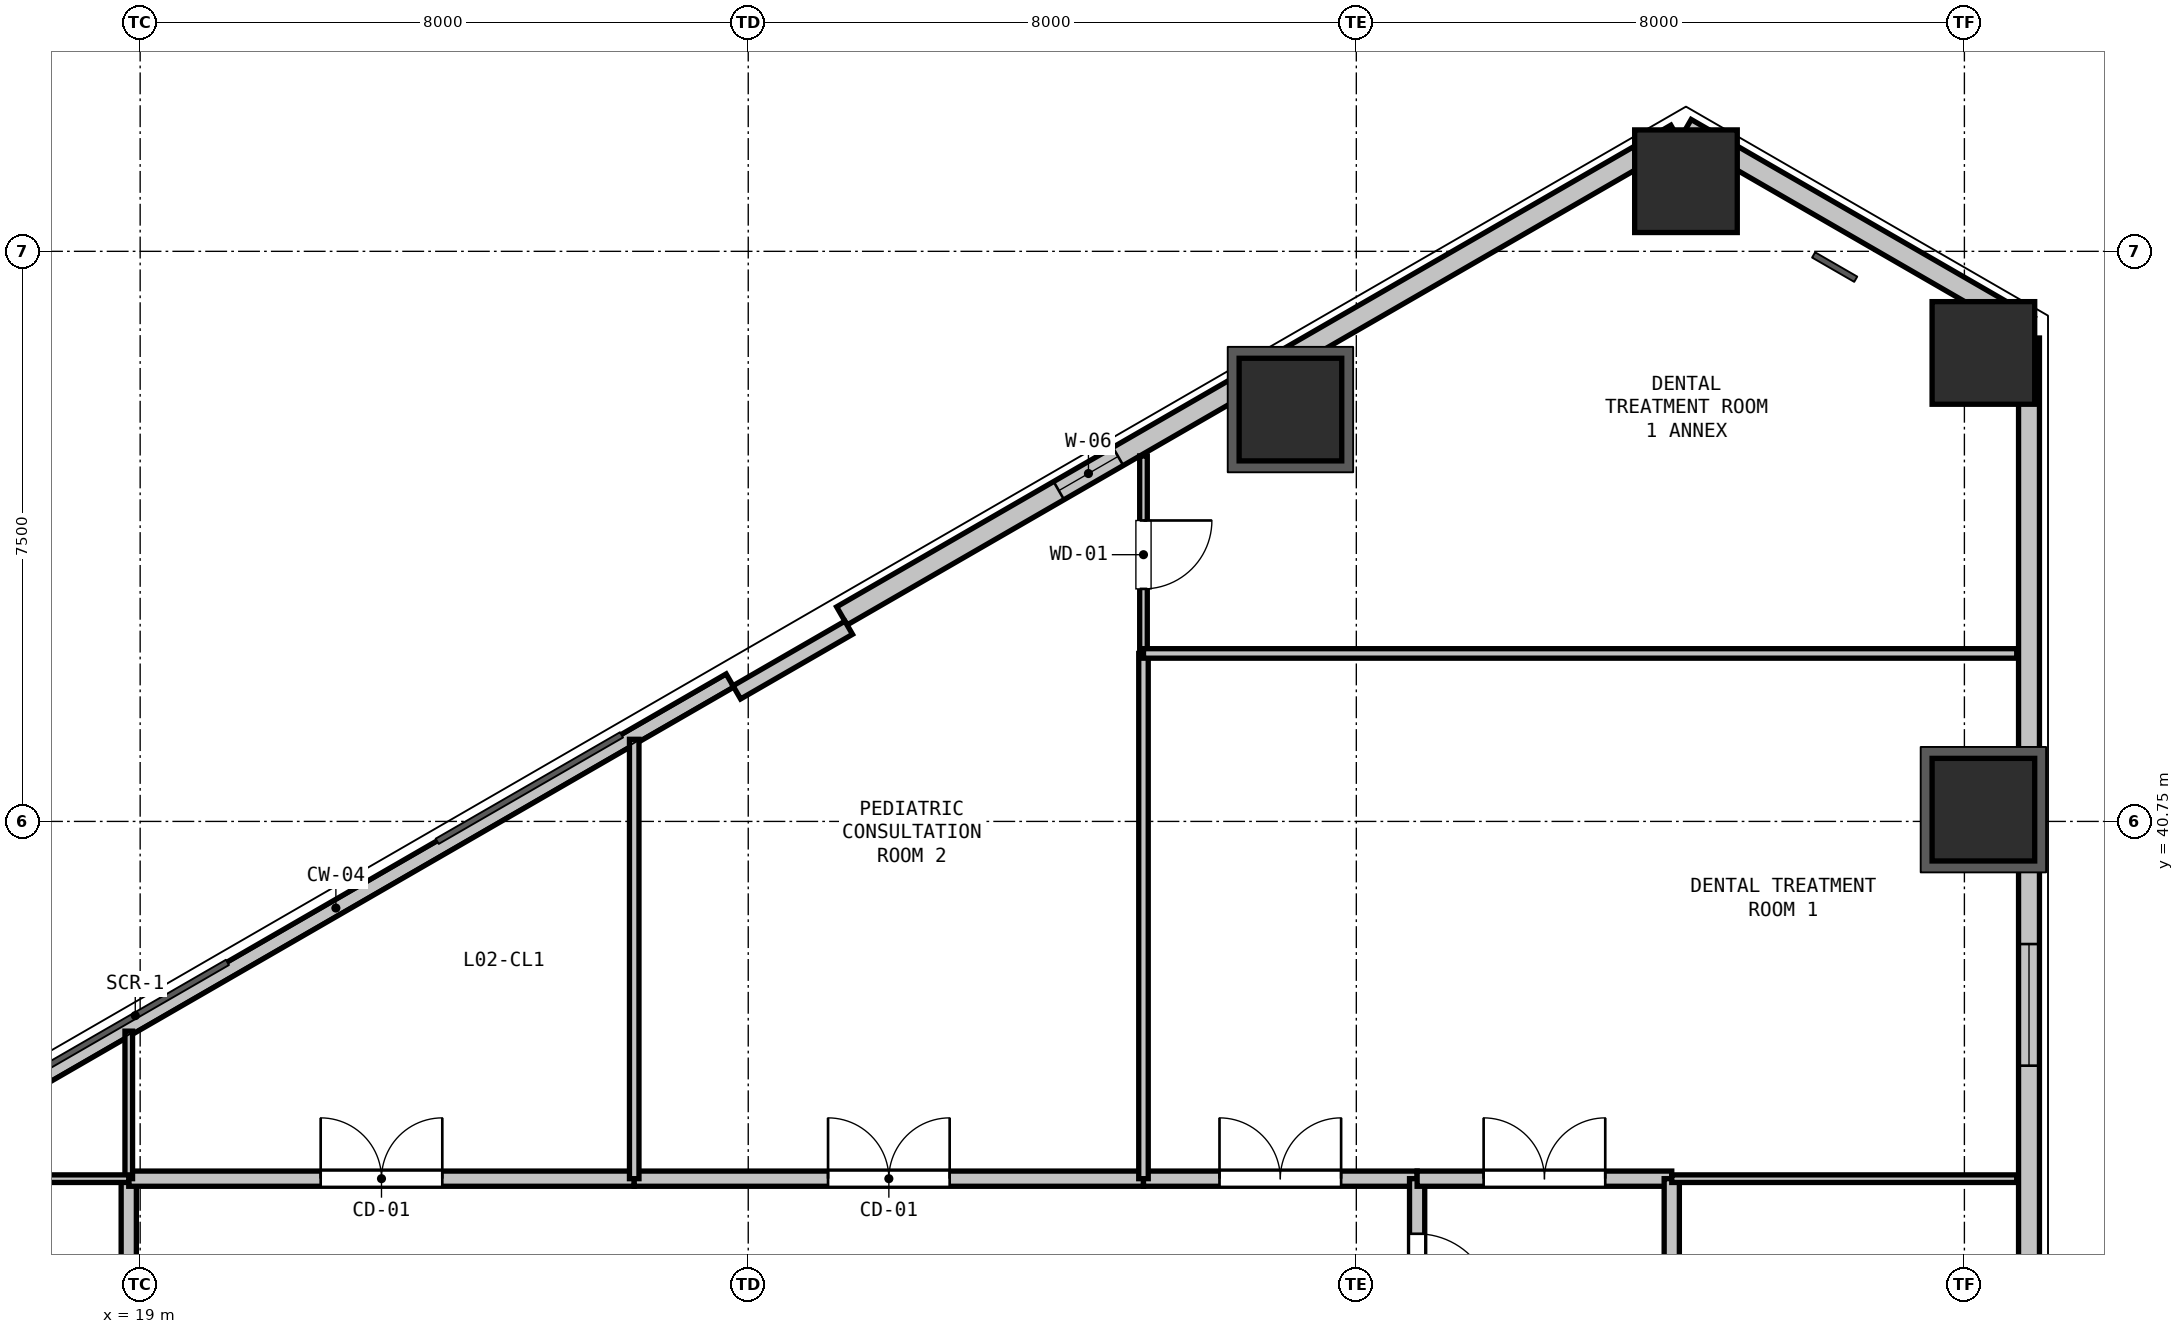
"""IFC4 building model, lengths in metres.
Left out: names, types, materials, properties, quantities, classifications, styles, units other than length and angle.
Written with IfcOpenShell. Run it as: python <this file> out.ifc"""

import sys

from ifc_helpers import new_model, si_unit, direction, frame, frame_2d, origin, origin_2d, place, context, subcontext, project, spatial, rectangle, hollow_rectangle, extrude, element, fill, save


model = new_model("IFC4")
c1 = context("Model", 3, precision=1e-05, world=origin(), true_north=direction((0.0, 1.0)))
c2 = subcontext(c1, "Body", "Model", "MODEL_VIEW")
j1 = project(units=[si_unit("LENGTHUNIT", "METRE"), si_unit("PLANEANGLEUNIT", "RADIAN")], contexts=[c1])
p1 = place(None, origin())
s1 = spatial("IfcSite", under=j1, at=p1, CompositionType="ELEMENT")
p2 = place(p1, origin())
s2 = spatial("IfcBuilding", under=s1, at=p2, CompositionType="ELEMENT")
p3 = place(p2, frame((0.0, 0.0, 9.6)))
s3 = spatial("IfcBuildingStorey", under=s2, at=p3, CompositionType="ELEMENT", Elevation=9.6)
for number, where, z_axis, x_axis in (
    (1, (34.133, 46.168, -0.32), (0.0, 0.0, 1.0), (1.0, 0.0, 0.0)),
    (2, (39.337, 49.173, -0.32), (0.0, 0.0, 1.0), (1.0, 0.0, 0.0)),
    (3, (43.25, 46.913, -0.32), (0.0, 0.0, 1.0), (1.0, 0.0, 0.0)),
    (4, (43.25, 40.905, -0.32), (0.0, 0.0, 1.0), (1.0, 0.0, 0.0)),
):
    element("IfcColumn", number, at=place(p3, frame(where, z_axis=z_axis, x_axis=x_axis)), inside=s3, PredefinedType="COLUMN", context=c2, shape_type="SweptSolid", body=[
        extrude(hollow_rectangle(XDim=1.35, YDim=1.35, WallThickness=0.036, at=origin_2d()), origin(), (0.0, 0.0, 1.0), 5.12),
    ])
p4 = place(p3, frame((39.337, 49.865, 0.0), z_axis=(0.0, 0.0, 1.0), x_axis=(0.866043601342, -0.499968479581, 0.0)))
e5 = element("IfcWall", 5, at=p4, inside=s3, PredefinedType="SOLIDWALL", context=c2, shape_type="SweptSolid", body=[
    extrude(rectangle(XDim=5.211, YDim=0.275, at=frame_2d((2.605, 0.0))), origin(), (0.0, 0.0, 1.0), 4.1),
])
p5 = place(p3, frame((16.39, 36.617, 0.0), z_axis=(0.0, 0.0, 1.0), x_axis=(0.866027351828, 0.499996625875, 0.0)))
e6 = element("IfcWall", 6, at=p5, inside=s3, PredefinedType="PARAPET", context=c2, shape_type="SweptSolid", body=[
    extrude(rectangle(XDim=11.973, YDim=0.2, at=frame_2d((5.987, 0.0))), origin(), (0.0, 0.0, 1.0), 0.2),
])
p6 = place(p3, frame((28.232, 43.454, 0.0), z_axis=(0.0, 0.0, 1.0), x_axis=(0.86603192154, 0.499988710747, 0.0)))
e7 = element("IfcWall", 7, at=p6, inside=s3, PredefinedType="SOLIDWALL", context=c2, shape_type="SweptSolid", body=[
    extrude(rectangle(XDim=12.673, YDim=0.275, at=frame_2d((6.336, 0.0))), origin(), (0.0, 0.0, 1.0), 4.1),
])
p7 = place(p6, frame((3.296, 0.0, 0.9)))
e8 = element("IfcOpeningElement", 8, at=p7, cuts=e7, PredefinedType="OPENING", context=c2, shape_type="SweptSolid", body=[
    extrude(rectangle(XDim=0.9, YDim=1.4, at=frame_2d((0.45, 0.7))), frame((0.0, 0.147, 0.0), z_axis=(0.0, -1.0, 0.0), x_axis=(1.0, 0.0, 0.0)), (0.0, 0.0, 1.0), 0.295),
])
p8 = place(p3, frame((26.85, 42.448, 0.0), z_axis=(0.0, 0.0, 1.0), x_axis=(0.86605165483, 0.499954529098, 0.0)))
e9 = element("IfcWall", 9, at=p8, inside=s3, PredefinedType="PARAPET", context=c2, shape_type="SweptSolid", body=[
    extrude(rectangle(XDim=1.7, YDim=0.2, at=frame_2d((0.85, 0.0))), origin(), (0.0, 0.0, 1.0), 4.1),
])
p9 = place(p3, frame((43.85, 47.11, 0.0), z_axis=(0.0, 0.0, 1.0), x_axis=(0.0, -1.0, 0.0)))
e10 = element("IfcWall", 10, at=p9, inside=s3, PredefinedType="SOLIDWALL", context=c2, shape_type="SweptSolid", body=[
    extrude(rectangle(XDim=12.673, YDim=0.275, at=frame_2d((6.336, 0.0))), origin(), (0.0, 0.0, 1.0), 4.1),
])
p10 = place(p9, frame((7.973, 0.0, 0.9)))
e11 = element("IfcOpeningElement", 11, at=p10, cuts=e10, PredefinedType="OPENING", context=c2, shape_type="SweptSolid", body=[
    extrude(rectangle(XDim=1.6, YDim=1.8, at=frame_2d((0.8, 0.9))), frame((0.0, 0.147, 0.0), z_axis=(0.0, -1.0, 0.0), x_axis=(1.0, 0.0, 0.0)), (0.0, 0.0, 1.0), 0.295),
])
p11 = place(p3, frame((18.85, 27.2, 0.0), z_axis=(0.0, 0.0, 1.0), x_axis=(0.0, 1.0, 0.0)))
e12 = element("IfcWall", 12, at=p11, inside=s3, PredefinedType="PARTITIONING", context=c2, shape_type="SweptSolid", body=[
    extrude(rectangle(XDim=8.85, YDim=0.2, at=frame_2d((4.425, 0.0))), origin(), (0.0, 0.0, 1.0), 3.777),
])
p12 = place(p11, frame((3.925, 0.0, 0.0)))
e13 = element("IfcOpeningElement", 13, at=p12, cuts=e12, PredefinedType="OPENING", context=c2, shape_type="SweptSolid", body=[
    extrude(rectangle(XDim=1.0, YDim=2.15, at=frame_2d((0.5, 1.075))), frame((0.0, 0.11, 0.0), z_axis=(0.0, -1.0, 0.0), x_axis=(1.0, 0.0, 0.0)), (0.0, 0.0, 1.0), 0.22),
])
p13 = place(p3, frame((18.85, 36.05, 0.0), z_axis=(0.0, 0.0, 1.0), x_axis=(1.0, 0.0, 0.0)))
e14 = element("IfcWall", 14, at=p13, inside=s3, PredefinedType="PARTITIONING", context=c2, shape_type="SweptSolid", body=[
    extrude(rectangle(XDim=6.65, YDim=0.2, at=frame_2d((3.325, 0.0))), origin(), (0.0, 0.0, 1.0), 4.48),
])
p14 = place(p13, frame((2.525, 0.0, 0.0)))
e15 = element("IfcOpeningElement", 15, at=p14, cuts=e14, PredefinedType="OPENING", context=c2, shape_type="SweptSolid", body=[
    extrude(rectangle(XDim=1.6, YDim=2.2, at=frame_2d((0.8, 1.1))), frame((0.0, 0.11, 0.0), z_axis=(0.0, -1.0, 0.0), x_axis=(1.0, 0.0, 0.0)), (0.0, 0.0, 1.0), 0.22),
])
p15 = place(p3, frame((25.5, 36.05, 0.0), z_axis=(0.0, 0.0, 1.0), x_axis=(1.0, 0.0, 0.0)))
e16 = element("IfcWall", 16, at=p15, inside=s3, PredefinedType="PARTITIONING", context=c2, shape_type="SweptSolid", body=[
    extrude(rectangle(XDim=6.7, YDim=0.2, at=frame_2d((3.35, 0.0))), origin(), (0.0, 0.0, 1.0), 4.48),
])
p16 = place(p15, frame((2.55, 0.0, 0.0)))
e17 = element("IfcOpeningElement", 17, at=p16, cuts=e16, PredefinedType="OPENING", context=c2, shape_type="SweptSolid", body=[
    extrude(rectangle(XDim=1.6, YDim=2.2, at=frame_2d((0.8, 1.1))), frame((0.0, 0.11, 0.0), z_axis=(0.0, -1.0, 0.0), x_axis=(1.0, 0.0, 0.0)), (0.0, 0.0, 1.0), 0.22),
])
p17 = place(p3, frame((32.2, 36.05, 0.0), z_axis=(0.0, 0.0, 1.0), x_axis=(1.0, 0.0, 0.0)))
e18 = element("IfcWall", 18, at=p17, inside=s3, PredefinedType="PARTITIONING", context=c2, shape_type="SweptSolid", body=[
    extrude(rectangle(XDim=3.6, YDim=0.2, at=frame_2d((1.8, 0.0))), origin(), (0.0, 0.0, 1.0), 4.48),
])
p18 = place(p17, frame((1.0, 0.0, 0.0)))
e19 = element("IfcOpeningElement", 19, at=p18, cuts=e18, PredefinedType="OPENING", context=c2, shape_type="SweptSolid", body=[
    extrude(rectangle(XDim=1.6, YDim=2.2, at=frame_2d((0.8, 1.1))), frame((0.0, 0.11, 0.0), z_axis=(0.0, -1.0, 0.0), x_axis=(1.0, 0.0, 0.0)), (0.0, 0.0, 1.0), 0.22),
])
p19 = place(p3, frame((35.8, 36.05, 0.0), z_axis=(0.0, 0.0, 1.0), x_axis=(0.0, -1.0, 0.0)))
e20 = element("IfcWall", 20, at=p19, inside=s3, PredefinedType="PARTITIONING", context=c2, shape_type="SweptSolid", body=[
    extrude(rectangle(XDim=2.45, YDim=0.2, at=frame_2d((1.225, 0.0))), origin(), (0.0, 0.0, 1.0), 4.48),
])
p20 = place(p19, frame((0.725, 0.0, 0.0)))
e21 = element("IfcOpeningElement", 21, at=p20, cuts=e20, PredefinedType="OPENING", context=c2, shape_type="SweptSolid", body=[
    extrude(rectangle(XDim=1.0, YDim=2.15, at=frame_2d((0.5, 1.075))), frame((0.0, 0.11, 0.0), z_axis=(0.0, -1.0, 0.0), x_axis=(1.0, 0.0, 0.0)), (0.0, 0.0, 1.0), 0.22),
])
p21 = place(p3, frame((35.8, 36.05, 0.0), z_axis=(0.0, 0.0, 1.0), x_axis=(1.0, 0.0, 0.0)))
e22 = element("IfcWall", 22, at=p21, inside=s3, PredefinedType="PARTITIONING", context=c2, shape_type="SweptSolid", body=[
    extrude(rectangle(XDim=3.35, YDim=0.2, at=frame_2d((1.675, 0.0))), origin(), (0.0, 0.0, 1.0), 3.777),
])
p22 = place(p21, frame((0.875, 0.0, 0.0)))
e23 = element("IfcOpeningElement", 23, at=p22, cuts=e22, PredefinedType="OPENING", context=c2, shape_type="SweptSolid", body=[
    extrude(rectangle(XDim=1.6, YDim=2.2, at=frame_2d((0.8, 1.1))), frame((0.0, 0.11, 0.0), z_axis=(0.0, -1.0, 0.0), x_axis=(1.0, 0.0, 0.0)), (0.0, 0.0, 1.0), 0.22),
])
p23 = place(p3, frame((39.15, 36.05, 0.0), z_axis=(0.0, 0.0, 1.0), x_axis=(0.0, -1.0, 0.0)))
e24 = element("IfcWall", 24, at=p23, inside=s3, PredefinedType="PARTITIONING", context=c2, shape_type="SweptSolid", body=[
    extrude(rectangle(XDim=9.3, YDim=0.2, at=frame_2d((4.65, 0.0))), origin(), (0.0, 0.0, 1.0), 4.48),
])
p24 = place(p23, frame((4.15, 0.0, 0.0)))
e25 = element("IfcOpeningElement", 25, at=p24, cuts=e24, PredefinedType="OPENING", context=c2, shape_type="SweptSolid", body=[
    extrude(rectangle(XDim=1.0, YDim=2.15, at=frame_2d((0.5, 1.075))), frame((0.0, 0.11, 0.0), z_axis=(0.0, -1.0, 0.0), x_axis=(1.0, 0.0, 0.0)), (0.0, 0.0, 1.0), 0.22),
])
p25 = place(p3, frame((18.85, 36.05, 0.0), z_axis=(0.0, 0.0, 1.0), x_axis=(0.0, 1.0, 0.0)))
e26 = element("IfcWall", 26, at=p25, inside=s3, PredefinedType="PARTITIONING", context=c2, shape_type="SweptSolid", body=[
    extrude(rectangle(XDim=1.941, YDim=0.1, at=frame_2d((0.97, 0.0))), origin(), (0.0, 0.0, 1.0), 4.09),
])
p26 = place(p3, frame((25.5, 41.83, 0.0), z_axis=(0.0, 0.0, 1.0), x_axis=(0.0, -1.0, 0.0)))
e27 = element("IfcWall", 27, at=p26, inside=s3, PredefinedType="PARTITIONING", context=c2, shape_type="SweptSolid", body=[
    extrude(rectangle(XDim=5.78, YDim=0.125, at=frame_2d((2.89, 0.0))), origin(), (0.0, 0.0, 1.0), 4.09),
])
p27 = place(p3, frame((32.2, 45.558, 0.0), z_axis=(0.0, 0.0, 1.0), x_axis=(0.0, -1.0, 0.0)))
e28 = element("IfcWall", 28, at=p27, inside=s3, PredefinedType="PARTITIONING", context=c2, shape_type="SweptSolid", body=[
    extrude(rectangle(XDim=2.598, YDim=0.1, at=frame_2d((1.299, 0.0))), origin(), (0.0, 0.0, 1.0), 4.09),
])
p28 = place(p27, frame((0.849, 0.0, 0.0)))
e29 = element("IfcOpeningElement", 29, at=p28, cuts=e28, PredefinedType="OPENING", context=c2, shape_type="SweptSolid", body=[
    extrude(rectangle(XDim=0.9, YDim=2.1, at=frame_2d((0.45, 1.05))), frame((0.0, 0.06, 0.0), z_axis=(0.0, -1.0, 0.0), x_axis=(1.0, 0.0, 0.0)), (0.0, 0.0, 1.0), 0.12),
])
p29 = place(p3, frame((32.2, 42.96, 0.0), z_axis=(0.0, 0.0, 1.0), x_axis=(0.0, -1.0, 0.0)))
e30 = element("IfcWall", 30, at=p29, inside=s3, PredefinedType="PARTITIONING", context=c2, shape_type="SweptSolid", body=[
    extrude(rectangle(XDim=6.91, YDim=0.125, at=frame_2d((3.455, 0.0))), origin(), (0.0, 0.0, 1.0), 4.48),
])
p30 = place(p3, frame((43.688, 36.05, 0.0), z_axis=(0.0, 0.0, 1.0), x_axis=(-1.0, 0.0, 0.0)))
e31 = element("IfcWall", 31, at=p30, inside=s3, PredefinedType="PARTITIONING", context=c2, shape_type="SweptSolid", body=[
    extrude(rectangle(XDim=4.539, YDim=0.1, at=frame_2d((2.269, 0.0))), origin(), (0.0, 0.0, 1.0), 4.09),
])
p31 = place(p3, frame((32.2, 42.96, 0.0), z_axis=(0.0, 0.0, 1.0), x_axis=(1.0, 0.0, 0.0)))
e32 = element("IfcWall", 32, at=p31, inside=s3, PredefinedType="PARTITIONING", context=c2, shape_type="SweptSolid", body=[
    extrude(rectangle(XDim=11.489, YDim=0.125, at=frame_2d((5.744, 0.0))), origin(), (0.0, 0.0, 1.0), 3.777),
])
p32 = place(p3, frame((15.993, 36.05, 0.0), z_axis=(0.0, 0.0, 1.0), x_axis=(1.0, 0.0, 0.0)))
e33 = element("IfcWall", 33, at=p32, inside=s3, PredefinedType="PARTITIONING", context=c2, shape_type="SweptSolid", body=[
    extrude(rectangle(XDim=2.857, YDim=0.1, at=frame_2d((1.428, 0.0))), origin(), (0.0, 0.0, 1.0), 4.09),
])
p33 = place(p7, origin())
e34 = element("IfcWindow", 34, at=p33, inside=s3, PartitioningType="SINGLE_PANEL", PredefinedType="WINDOW", context=c2, shape_type="SweptSolid", body=[
    extrude(rectangle(XDim=0.9, YDim=1.4, at=frame_2d((0.45, 0.7))), frame((0.0, 0.03, 0.0), z_axis=(0.0, -1.0, 0.0), x_axis=(1.0, 0.0, 0.0)), (0.0, 0.0, 1.0), 0.06),
])
fill(e8, e34)
p34 = place(p10, origin())
e35 = element("IfcWindow", 35, at=p34, inside=s3, PartitioningType="SINGLE_PANEL", PredefinedType="WINDOW", context=c2, shape_type="SweptSolid", body=[
    extrude(rectangle(XDim=1.6, YDim=1.8, at=frame_2d((0.8, 0.9))), frame((0.0, 0.03, 0.0), z_axis=(0.0, -1.0, 0.0), x_axis=(1.0, 0.0, 0.0)), (0.0, 0.0, 1.0), 0.06),
])
fill(e11, e35)
p35 = place(p20, origin())
e36 = element("IfcDoor", 36, at=p35, inside=s3, OperationType="SINGLE_SWING_RIGHT", PredefinedType="DOOR", context=c2, shape_type="SweptSolid", body=[
    extrude(rectangle(XDim=1.0, YDim=2.15, at=frame_2d((0.5, 1.075))), frame((0.0, 0.025, 0.0), z_axis=(0.0, -1.0, 0.0), x_axis=(1.0, 0.0, 0.0)), (0.0, 0.0, 1.0), 0.05),
])
fill(e21, e36)
p36 = place(p14, origin())
e37 = element("IfcDoor", 37, at=p36, inside=s3, OperationType="DOUBLE_DOOR_SINGLE_SWING", PredefinedType="DOOR", context=c2, shape_type="SweptSolid", body=[
    extrude(rectangle(XDim=1.6, YDim=2.2, at=frame_2d((0.8, 1.1))), frame((0.0, 0.025, 0.0), z_axis=(0.0, -1.0, 0.0), x_axis=(1.0, 0.0, 0.0)), (0.0, 0.0, 1.0), 0.05),
])
fill(e15, e37)
p37 = place(p16, origin())
e38 = element("IfcDoor", 38, at=p37, inside=s3, OperationType="DOUBLE_DOOR_SINGLE_SWING", PredefinedType="DOOR", context=c2, shape_type="SweptSolid", body=[
    extrude(rectangle(XDim=1.6, YDim=2.2, at=frame_2d((0.8, 1.1))), frame((0.0, 0.025, 0.0), z_axis=(0.0, -1.0, 0.0), x_axis=(1.0, 0.0, 0.0)), (0.0, 0.0, 1.0), 0.05),
])
fill(e17, e38)
p38 = place(p18, origin())
e39 = element("IfcDoor", 39, at=p38, inside=s3, OperationType="DOUBLE_DOOR_SINGLE_SWING", PredefinedType="DOOR", context=c2, shape_type="SweptSolid", body=[
    extrude(rectangle(XDim=1.6, YDim=2.2, at=frame_2d((0.8, 1.1))), frame((0.0, 0.025, 0.0), z_axis=(0.0, -1.0, 0.0), x_axis=(1.0, 0.0, 0.0)), (0.0, 0.0, 1.0), 0.05),
])
fill(e19, e39)
p39 = place(p22, origin())
e40 = element("IfcDoor", 40, at=p39, inside=s3, OperationType="DOUBLE_DOOR_SINGLE_SWING", PredefinedType="DOOR", context=c2, shape_type="SweptSolid", body=[
    extrude(rectangle(XDim=1.6, YDim=2.2, at=frame_2d((0.8, 1.1))), frame((0.0, 0.025, 0.0), z_axis=(0.0, -1.0, 0.0), x_axis=(1.0, 0.0, 0.0)), (0.0, 0.0, 1.0), 0.05),
])
fill(e23, e40)
p40 = place(p28, origin())
e41 = element("IfcDoor", 41, at=p40, inside=s3, OperationType="SINGLE_SWING_LEFT", PredefinedType="DOOR", context=c2, shape_type="SweptSolid", body=[
    extrude(rectangle(XDim=0.9, YDim=2.1, at=frame_2d((0.45, 1.05))), frame((0.0, 0.025, 0.0), z_axis=(0.0, -1.0, 0.0), x_axis=(1.0, 0.0, 0.0)), (0.0, 0.0, 1.0), 0.05),
])
fill(e29, e41)
save(model, sys.argv[1])
